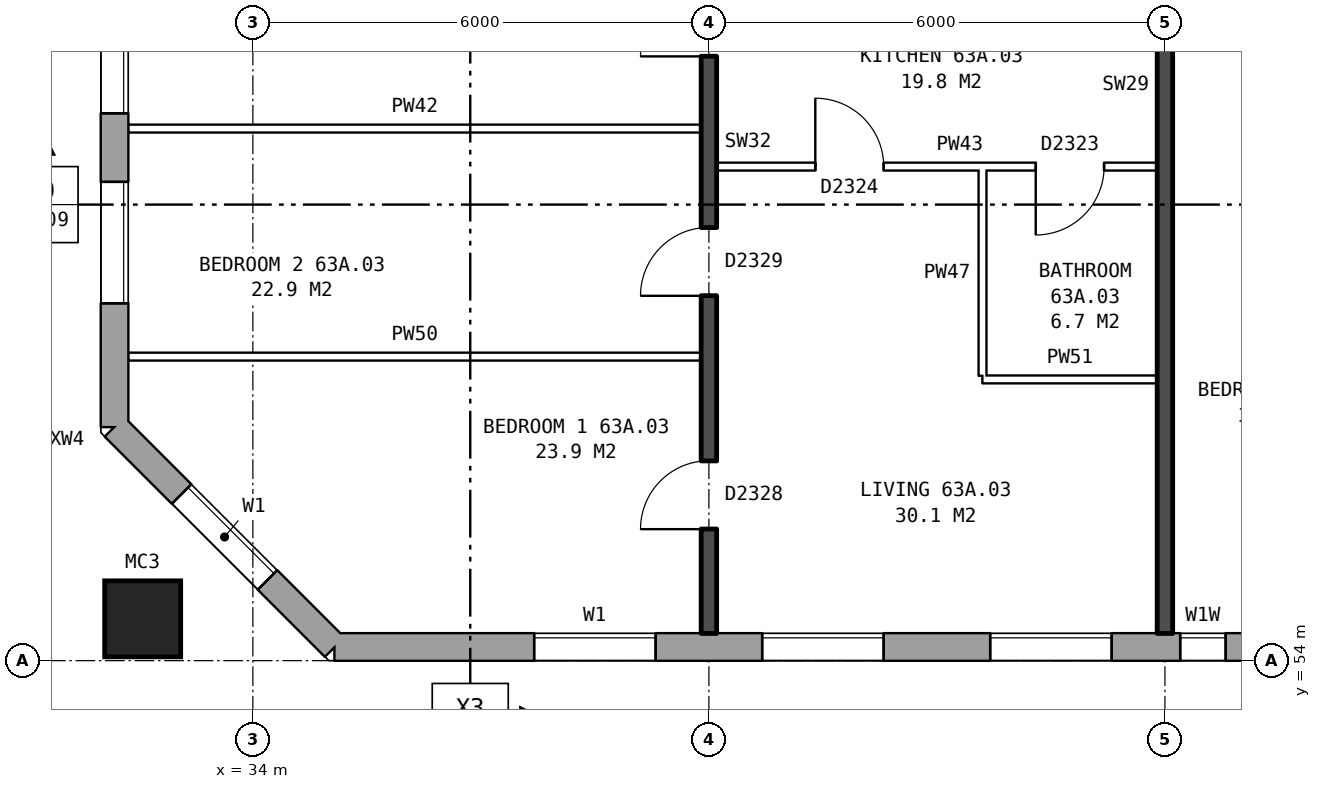
"""IFC4 building model, lengths in metres.
Left out: names, types, materials, properties, quantities, classifications, styles, units other than length and angle.
Written with IfcOpenShell. Run it as: python <this file> out.ifc"""

import sys

from ifc_helpers import new_model, si_unit, direction, frame, frame_2d, origin, origin_2d, place, context, subcontext, project, spatial, rectangle, hollow_rectangle, extrude, element, fill, save


model = new_model("IFC4")
c1 = context("Model", 3, precision=1e-05, world=origin(), true_north=direction((0.0, 1.0)))
c2 = subcontext(c1, "Body", "Model", "MODEL_VIEW")
j1 = project(units=[si_unit("LENGTHUNIT", "METRE"), si_unit("PLANEANGLEUNIT", "RADIAN")], contexts=[c1])
p1 = place(None, origin())
s1 = spatial("IfcSite", under=j1, at=p1, CompositionType="ELEMENT")
p2 = place(p1, origin())
s2 = spatial("IfcBuilding", under=s1, at=p2, CompositionType="ELEMENT")
p3 = place(p2, frame((0.0, 0.0, 224.5)))
s3 = spatial("IfcBuildingStorey", under=s2, at=p3, CompositionType="ELEMENT", Elevation=224.5)
p4 = place(p3, frame((32.55, 54.55, 0.0), z_axis=(0.0, 0.0, 1.0), x_axis=(1.0, 0.0, 0.0)))
e1 = element("IfcColumn", 1, at=p4, inside=s3, PredefinedType="COLUMN", context=c2, shape_type="SweptSolid", body=[
    extrude(hollow_rectangle(XDim=1.0, YDim=1.0, WallThickness=0.055, at=origin_2d()), origin(), (0.0, 0.0, 1.0), 3.1),
])
p5 = place(p3, frame((32.18, 57.075, 0.0), z_axis=(0.0, 0.0, 1.0), x_axis=(0.707106781187, -0.707106781187, 0.0)))
e2 = element("IfcWall", 2, at=p5, inside=s3, PredefinedType="STANDARD", context=c2, shape_type="SweptSolid", body=[
    extrude(rectangle(XDim=4.094, YDim=0.36, at=frame_2d((2.047, 0.0))), origin(), (0.0, 0.0, 1.0), 2.85),
])
p6 = place(p5, frame((1.247, 0.0, 0.8)))
e3 = element("IfcOpeningElement", 3, at=p6, cuts=e2, PredefinedType="OPENING", context=c2, shape_type="SweptSolid", body=[
    extrude(rectangle(XDim=1.6, YDim=1.8, at=frame_2d((0.8, 0.9))), frame((0.0, 0.19, 0.0), z_axis=(0.0, -1.0, 0.0), x_axis=(1.0, 0.0, 0.0)), (0.0, 0.0, 1.0), 0.38),
])
p7 = place(p3, frame((35.075, 54.18, 0.0), z_axis=(0.0, 0.0, 1.0), x_axis=(1.0, 0.0, 0.0)))
e4 = element("IfcWall", 4, at=p7, inside=s3, PredefinedType="STANDARD", context=c2, shape_type="SweptSolid", body=[
    extrude(rectangle(XDim=39.875, YDim=0.36, at=frame_2d((19.938, 0.0))), origin(), (0.0, 0.0, 1.0), 2.85),
])
p8 = place(p7, frame((2.625, 0.0, 0.8)))
e5 = element("IfcOpeningElement", 5, at=p8, cuts=e4, PredefinedType="OPENING", context=c2, shape_type="SweptSolid", body=[
    extrude(rectangle(XDim=1.6, YDim=1.8, at=frame_2d((0.8, 0.9))), frame((0.0, 0.19, 0.0), z_axis=(0.0, -1.0, 0.0), x_axis=(1.0, 0.0, 0.0)), (0.0, 0.0, 1.0), 0.38),
])
p9 = place(p7, frame((5.625, 0.0, 0.8)))
e6 = element("IfcOpeningElement", 6, at=p9, cuts=e4, PredefinedType="OPENING", context=c2, shape_type="SweptSolid", body=[
    extrude(rectangle(XDim=1.6, YDim=1.8, at=frame_2d((0.8, 0.9))), frame((0.0, 0.19, 0.0), z_axis=(0.0, -1.0, 0.0), x_axis=(1.0, 0.0, 0.0)), (0.0, 0.0, 1.0), 0.38),
])
p10 = place(p7, frame((8.625, 0.0, 0.8)))
e7 = element("IfcOpeningElement", 7, at=p10, cuts=e4, PredefinedType="OPENING", context=c2, shape_type="SweptSolid", body=[
    extrude(rectangle(XDim=1.6, YDim=1.8, at=frame_2d((0.8, 0.9))), frame((0.0, 0.19, 0.0), z_axis=(0.0, -1.0, 0.0), x_axis=(1.0, 0.0, 0.0)), (0.0, 0.0, 1.0), 0.38),
])
p11 = place(p7, frame((11.125, 0.0, 1.65)))
e8 = element("IfcOpeningElement", 8, at=p11, cuts=e4, PredefinedType="OPENING", context=c2, shape_type="SweptSolid", body=[
    extrude(rectangle(XDim=0.6, YDim=0.9, at=frame_2d((0.3, 0.45))), frame((0.0, 0.19, 0.0), z_axis=(0.0, -1.0, 0.0), x_axis=(1.0, 0.0, 0.0)), (0.0, 0.0, 1.0), 0.38),
])
p12 = place(p7, frame((14.625, 0.0, 0.8)))
e9 = element("IfcOpeningElement", 9, at=p12, cuts=e4, PredefinedType="OPENING", context=c2, shape_type="SweptSolid", body=[
    extrude(rectangle(XDim=1.6, YDim=1.8, at=frame_2d((0.8, 0.9))), frame((0.0, 0.19, 0.0), z_axis=(0.0, -1.0, 0.0), x_axis=(1.0, 0.0, 0.0)), (0.0, 0.0, 1.0), 0.38),
])
p13 = place(p7, frame((17.625, 0.0, 0.8)))
e10 = element("IfcOpeningElement", 10, at=p13, cuts=e4, PredefinedType="OPENING", context=c2, shape_type="SweptSolid", body=[
    extrude(rectangle(XDim=1.6, YDim=1.8, at=frame_2d((0.8, 0.9))), frame((0.0, 0.19, 0.0), z_axis=(0.0, -1.0, 0.0), x_axis=(1.0, 0.0, 0.0)), (0.0, 0.0, 1.0), 0.38),
])
p14 = place(p7, frame((20.625, 0.0, 0.8)))
e11 = element("IfcOpeningElement", 11, at=p14, cuts=e4, PredefinedType="OPENING", context=c2, shape_type="SweptSolid", body=[
    extrude(rectangle(XDim=1.6, YDim=1.8, at=frame_2d((0.8, 0.9))), frame((0.0, 0.19, 0.0), z_axis=(0.0, -1.0, 0.0), x_axis=(1.0, 0.0, 0.0)), (0.0, 0.0, 1.0), 0.38),
])
p15 = place(p7, frame((23.125, 0.0, 0.75)))
e12 = element("IfcOpeningElement", 12, at=p15, cuts=e4, PredefinedType="OPENING", context=c2, shape_type="SweptSolid", body=[
    extrude(rectangle(XDim=1.2, YDim=1.8, at=frame_2d((0.6, 0.9))), frame((0.0, 0.19, 0.0), z_axis=(0.0, -1.0, 0.0), x_axis=(1.0, 0.0, 0.0)), (0.0, 0.0, 1.0), 0.38),
])
p16 = place(p7, frame((26.625, 0.0, 0.8)))
e13 = element("IfcOpeningElement", 13, at=p16, cuts=e4, PredefinedType="OPENING", context=c2, shape_type="SweptSolid", body=[
    extrude(rectangle(XDim=1.6, YDim=1.8, at=frame_2d((0.8, 0.9))), frame((0.0, 0.19, 0.0), z_axis=(0.0, -1.0, 0.0), x_axis=(1.0, 0.0, 0.0)), (0.0, 0.0, 1.0), 0.38),
])
p17 = place(p7, frame((29.625, 0.0, 0.8)))
e14 = element("IfcOpeningElement", 14, at=p17, cuts=e4, PredefinedType="OPENING", context=c2, shape_type="SweptSolid", body=[
    extrude(rectangle(XDim=1.6, YDim=1.8, at=frame_2d((0.8, 0.9))), frame((0.0, 0.19, 0.0), z_axis=(0.0, -1.0, 0.0), x_axis=(1.0, 0.0, 0.0)), (0.0, 0.0, 1.0), 0.38),
])
p18 = place(p7, frame((32.625, 0.0, 0.8)))
e15 = element("IfcOpeningElement", 15, at=p18, cuts=e4, PredefinedType="OPENING", context=c2, shape_type="SweptSolid", body=[
    extrude(rectangle(XDim=1.6, YDim=1.8, at=frame_2d((0.8, 0.9))), frame((0.0, 0.19, 0.0), z_axis=(0.0, -1.0, 0.0), x_axis=(1.0, 0.0, 0.0)), (0.0, 0.0, 1.0), 0.38),
])
p19 = place(p7, frame((35.625, 0.0, 0.8)))
e16 = element("IfcOpeningElement", 16, at=p19, cuts=e4, PredefinedType="OPENING", context=c2, shape_type="SweptSolid", body=[
    extrude(rectangle(XDim=1.6, YDim=1.8, at=frame_2d((0.8, 0.9))), frame((0.0, 0.19, 0.0), z_axis=(0.0, -1.0, 0.0), x_axis=(1.0, 0.0, 0.0)), (0.0, 0.0, 1.0), 0.38),
])
p20 = place(p7, frame((12.925, 0.0, 0.15)))
e17 = element("IfcOpeningElement", 17, at=p20, cuts=e4, PredefinedType="OPENING", context=c2, shape_type="SweptSolid", body=[
    extrude(rectangle(XDim=0.8, YDim=1.5, at=frame_2d((0.4, 0.75))), frame((0.0, 0.19, 0.0), z_axis=(0.0, -1.0, 0.0), x_axis=(1.0, 0.0, 0.0)), (0.0, 0.0, 1.0), 0.38),
])
p21 = place(p7, frame((24.625, 0.0, 0.25)))
e18 = element("IfcOpeningElement", 18, at=p21, cuts=e4, PredefinedType="OPENING", context=c2, shape_type="SweptSolid", body=[
    extrude(rectangle(XDim=0.6, YDim=0.9, at=frame_2d((0.3, 0.45))), frame((0.0, 0.19, 0.0), z_axis=(0.0, -1.0, 0.0), x_axis=(1.0, 0.0, 0.0)), (0.0, 0.0, 1.0), 0.38),
])
p22 = place(p3, frame((32.18, 82.925, 0.0), z_axis=(0.0, 0.0, 1.0), x_axis=(0.0, -1.0, 0.0)))
e19 = element("IfcWall", 19, at=p22, inside=s3, PredefinedType="STANDARD", context=c2, shape_type="SweptSolid", body=[
    extrude(rectangle(XDim=25.851, YDim=0.36, at=frame_2d((12.925, 0.0))), origin(), (0.0, 0.0, 1.0), 2.85),
])
p23 = place(p22, frame((1.625, 0.0, 0.8)))
e20 = element("IfcOpeningElement", 20, at=p23, cuts=e19, PredefinedType="OPENING", context=c2, shape_type="SweptSolid", body=[
    extrude(rectangle(XDim=1.6, YDim=1.8, at=frame_2d((0.8, 0.9))), frame((0.0, 0.19, 0.0), z_axis=(0.0, -1.0, 0.0), x_axis=(1.0, 0.0, 0.0)), (0.0, 0.0, 1.0), 0.38),
])
p24 = place(p22, frame((4.075, 0.0, 0.8)))
e21 = element("IfcOpeningElement", 21, at=p24, cuts=e19, PredefinedType="OPENING", context=c2, shape_type="SweptSolid", body=[
    extrude(rectangle(XDim=1.4, YDim=1.8, at=frame_2d((0.7, 0.9))), frame((0.0, 0.19, 0.0), z_axis=(0.0, -1.0, 0.0), x_axis=(1.0, 0.0, 0.0)), (0.0, 0.0, 1.0), 0.38),
])
p25 = place(p22, frame((19.425, 0.0, 0.8)))
e22 = element("IfcOpeningElement", 22, at=p25, cuts=e19, PredefinedType="OPENING", context=c2, shape_type="SweptSolid", body=[
    extrude(rectangle(XDim=0.6, YDim=0.9, at=frame_2d((0.3, 0.45))), frame((0.0, 0.19, 0.0), z_axis=(0.0, -1.0, 0.0), x_axis=(1.0, 0.0, 0.0)), (0.0, 0.0, 1.0), 0.38),
])
p26 = place(p22, frame((22.625, 0.0, 0.8)))
e23 = element("IfcOpeningElement", 23, at=p26, cuts=e19, PredefinedType="OPENING", context=c2, shape_type="SweptSolid", body=[
    extrude(rectangle(XDim=1.6, YDim=1.8, at=frame_2d((0.8, 0.9))), frame((0.0, 0.19, 0.0), z_axis=(0.0, -1.0, 0.0), x_axis=(1.0, 0.0, 0.0)), (0.0, 0.0, 1.0), 0.38),
])
p27 = place(p22, frame((5.775, 0.0, 0.8)))
e24 = element("IfcOpeningElement", 24, at=p27, cuts=e19, PredefinedType="OPENING", context=c2, shape_type="SweptSolid", body=[
    extrude(rectangle(XDim=0.6, YDim=0.9, at=frame_2d((0.3, 0.45))), frame((0.0, 0.19, 0.0), z_axis=(0.0, -1.0, 0.0), x_axis=(1.0, 0.0, 0.0)), (0.0, 0.0, 1.0), 0.38),
])
p28 = place(p22, frame((20.325, 0.0, 0.8)))
e25 = element("IfcOpeningElement", 25, at=p28, cuts=e19, PredefinedType="OPENING", context=c2, shape_type="SweptSolid", body=[
    extrude(rectangle(XDim=1.4, YDim=1.8, at=frame_2d((0.7, 0.9))), frame((0.0, 0.19, 0.0), z_axis=(0.0, -1.0, 0.0), x_axis=(1.0, 0.0, 0.0)), (0.0, 0.0, 1.0), 0.38),
])
p29 = place(p3, frame((43.6, 57.7, 0.0), z_axis=(0.0, 0.0, 1.0), x_axis=(1.0, 0.0, 0.0)))
e26 = element("IfcWall", 26, at=p29, inside=s3, PredefinedType="PARTITIONING", context=c2, shape_type="SweptSolid", body=[
    extrude(rectangle(XDim=2.3, YDim=0.1, at=frame_2d((1.15, 0.0))), origin(), (0.0, 0.0, 1.0), 2.85),
])
p30 = place(p3, frame((32.36, 58.0, 0.0), z_axis=(0.0, 0.0, 1.0), x_axis=(1.0, 0.0, 0.0)))
e27 = element("IfcWall", 27, at=p30, inside=s3, PredefinedType="PARTITIONING", context=c2, shape_type="SweptSolid", body=[
    extrude(rectangle(XDim=7.54, YDim=0.1, at=frame_2d((3.77, 0.0))), origin(), (0.0, 0.0, 1.0), 2.85),
])
p31 = place(p3, frame((40.1, 60.5, 0.0), z_axis=(0.0, 0.0, 1.0), x_axis=(1.0, 0.0, 0.0)))
e28 = element("IfcWall", 28, at=p31, inside=s3, PredefinedType="PARTITIONING", context=c2, shape_type="SweptSolid", body=[
    extrude(rectangle(XDim=5.8, YDim=0.1, at=frame_2d((2.9, 0.0))), origin(), (0.0, 0.0, 1.0), 2.85),
])
p32 = place(p31, frame((1.3, 0.0, 0.0)))
e29 = element("IfcOpeningElement", 29, at=p32, cuts=e28, PredefinedType="OPENING", context=c2, shape_type="SweptSolid", body=[
    extrude(rectangle(XDim=0.9, YDim=2.1, at=frame_2d((0.45, 1.05))), frame((0.0, 0.06, 0.0), z_axis=(0.0, -1.0, 0.0), x_axis=(1.0, 0.0, 0.0)), (0.0, 0.0, 1.0), 0.12),
])
p33 = place(p31, frame((4.2, 0.0, 0.0)))
e30 = element("IfcOpeningElement", 30, at=p33, cuts=e28, PredefinedType="OPENING", context=c2, shape_type="SweptSolid", body=[
    extrude(rectangle(XDim=0.9, YDim=2.1, at=frame_2d((0.45, 1.05))), frame((0.0, 0.06, 0.0), z_axis=(0.0, -1.0, 0.0), x_axis=(1.0, 0.0, 0.0)), (0.0, 0.0, 1.0), 0.12),
])
p34 = place(p3, frame((32.36, 61.0, 0.0), z_axis=(0.0, 0.0, 1.0), x_axis=(1.0, 0.0, 0.0)))
e31 = element("IfcWall", 31, at=p34, inside=s3, PredefinedType="PARTITIONING", context=c2, shape_type="SweptSolid", body=[
    extrude(rectangle(XDim=7.54, YDim=0.1, at=frame_2d((3.77, 0.0))), origin(), (0.0, 0.0, 1.0), 2.85),
])
p35 = place(p3, frame((40.0, 54.36, 0.0), z_axis=(0.0, 0.0, 1.0), x_axis=(0.0, 1.0, 0.0)))
e32 = element("IfcWall", 32, at=p35, inside=s3, PredefinedType="SOLIDWALL", context=c2, shape_type="SweptSolid", body=[
    extrude(rectangle(XDim=9.44, YDim=0.2, at=frame_2d((4.72, 0.0))), origin(), (0.0, 0.0, 1.0), 2.85),
])
p36 = place(p35, frame((1.37, 0.0, 0.0)))
e33 = element("IfcOpeningElement", 33, at=p36, cuts=e32, PredefinedType="OPENING", context=c2, shape_type="SweptSolid", body=[
    extrude(rectangle(XDim=0.9, YDim=2.1, at=frame_2d((0.45, 1.05))), frame((0.0, 0.11, 0.0), z_axis=(0.0, -1.0, 0.0), x_axis=(1.0, 0.0, 0.0)), (0.0, 0.0, 1.0), 0.22),
])
p37 = place(p35, frame((4.44, 0.0, 0.0)))
e34 = element("IfcOpeningElement", 34, at=p37, cuts=e32, PredefinedType="OPENING", context=c2, shape_type="SweptSolid", body=[
    extrude(rectangle(XDim=0.9, YDim=2.1, at=frame_2d((0.45, 1.05))), frame((0.0, 0.11, 0.0), z_axis=(0.0, -1.0, 0.0), x_axis=(1.0, 0.0, 0.0)), (0.0, 0.0, 1.0), 0.22),
])
p38 = place(p35, frame((7.59, 0.0, 0.0)))
e35 = element("IfcOpeningElement", 35, at=p38, cuts=e32, PredefinedType="OPENING", context=c2, shape_type="SweptSolid", body=[
    extrude(rectangle(XDim=0.9, YDim=2.1, at=frame_2d((0.45, 1.05))), frame((0.0, 0.11, 0.0), z_axis=(0.0, -1.0, 0.0), x_axis=(1.0, 0.0, 0.0)), (0.0, 0.0, 1.0), 0.22),
])
p39 = place(p3, frame((43.6, 57.75, 0.0), z_axis=(0.0, 0.0, 1.0), x_axis=(0.0, 1.0, 0.0)))
e36 = element("IfcWall", 36, at=p39, inside=s3, PredefinedType="PARTITIONING", context=c2, shape_type="SweptSolid", body=[
    extrude(rectangle(XDim=2.7, YDim=0.1, at=frame_2d((1.35, 0.0))), origin(), (0.0, 0.0, 1.0), 2.85),
])
p40 = place(p3, frame((46.0, 54.36, 0.0), z_axis=(0.0, 0.0, 1.0), x_axis=(0.0, 1.0, 0.0)))
e37 = element("IfcWall", 37, at=p40, inside=s3, PredefinedType="SOLIDWALL", context=c2, shape_type="SweptSolid", body=[
    extrude(rectangle(XDim=14.44, YDim=0.2, at=frame_2d((7.22, 0.0))), origin(), (0.0, 0.0, 1.0), 2.85),
])
p41 = place(p6, origin())
e38 = element("IfcWindow", 38, at=p41, inside=s3, PartitioningType="SINGLE_PANEL", PredefinedType="WINDOW", context=c2, shape_type="SweptSolid", body=[
    extrude(rectangle(XDim=1.6, YDim=1.8, at=frame_2d((0.8, 0.9))), frame((0.0, 0.15, 0.0), z_axis=(0.0, -1.0, 0.0), x_axis=(1.0, 0.0, 0.0)), (0.0, 0.0, 1.0), 0.06),
])
fill(e3, e38)
p42 = place(p8, origin())
e39 = element("IfcWindow", 39, at=p42, inside=s3, PartitioningType="SINGLE_PANEL", PredefinedType="WINDOW", context=c2, shape_type="SweptSolid", body=[
    extrude(rectangle(XDim=1.6, YDim=1.8, at=frame_2d((0.8, 0.9))), frame((0.0, 0.15, 0.0), z_axis=(0.0, -1.0, 0.0), x_axis=(1.0, 0.0, 0.0)), (0.0, 0.0, 1.0), 0.06),
])
fill(e5, e39)
p43 = place(p9, origin())
e40 = element("IfcWindow", 40, at=p43, inside=s3, PartitioningType="SINGLE_PANEL", PredefinedType="WINDOW", context=c2, shape_type="SweptSolid", body=[
    extrude(rectangle(XDim=1.6, YDim=1.8, at=frame_2d((0.8, 0.9))), frame((0.0, 0.15, 0.0), z_axis=(0.0, -1.0, 0.0), x_axis=(1.0, 0.0, 0.0)), (0.0, 0.0, 1.0), 0.06),
])
fill(e6, e40)
p44 = place(p10, origin())
e41 = element("IfcWindow", 41, at=p44, inside=s3, PartitioningType="SINGLE_PANEL", PredefinedType="WINDOW", context=c2, shape_type="SweptSolid", body=[
    extrude(rectangle(XDim=1.6, YDim=1.8, at=frame_2d((0.8, 0.9))), frame((0.0, 0.15, 0.0), z_axis=(0.0, -1.0, 0.0), x_axis=(1.0, 0.0, 0.0)), (0.0, 0.0, 1.0), 0.06),
])
fill(e7, e41)
p45 = place(p11, origin())
e42 = element("IfcWindow", 42, at=p45, inside=s3, PartitioningType="SINGLE_PANEL", PredefinedType="WINDOW", context=c2, shape_type="SweptSolid", body=[
    extrude(rectangle(XDim=0.6, YDim=0.9, at=frame_2d((0.3, 0.45))), frame((0.0, 0.15, 0.0), z_axis=(0.0, -1.0, 0.0), x_axis=(1.0, 0.0, 0.0)), (0.0, 0.0, 1.0), 0.06),
])
fill(e8, e42)
p46 = place(p26, origin())
e43 = element("IfcWindow", 43, at=p46, inside=s3, PartitioningType="SINGLE_PANEL", PredefinedType="WINDOW", context=c2, shape_type="SweptSolid", body=[
    extrude(rectangle(XDim=1.6, YDim=1.8, at=frame_2d((0.8, 0.9))), frame((0.0, 0.15, 0.0), z_axis=(0.0, -1.0, 0.0), x_axis=(1.0, 0.0, 0.0)), (0.0, 0.0, 1.0), 0.06),
])
fill(e23, e43)
p47 = place(p36, origin())
e44 = element("IfcDoor", 44, at=p47, inside=s3, OperationType="SINGLE_SWING_LEFT", PredefinedType="DOOR", context=c2, shape_type="SweptSolid", body=[
    extrude(rectangle(XDim=0.9, YDim=2.1, at=frame_2d((0.45, 1.05))), frame((0.0, 0.025, 0.0), z_axis=(0.0, -1.0, 0.0), x_axis=(1.0, 0.0, 0.0)), (0.0, 0.0, 1.0), 0.05),
])
fill(e33, e44)
p48 = place(p37, origin())
e45 = element("IfcDoor", 45, at=p48, inside=s3, OperationType="SINGLE_SWING_LEFT", PredefinedType="DOOR", context=c2, shape_type="SweptSolid", body=[
    extrude(rectangle(XDim=0.9, YDim=2.1, at=frame_2d((0.45, 1.05))), frame((0.0, 0.025, 0.0), z_axis=(0.0, -1.0, 0.0), x_axis=(1.0, 0.0, 0.0)), (0.0, 0.0, 1.0), 0.05),
])
fill(e34, e45)
p49 = place(p38, origin())
e46 = element("IfcDoor", 46, at=p49, inside=s3, OperationType="SINGLE_SWING_LEFT", PredefinedType="DOOR", context=c2, shape_type="SweptSolid", body=[
    extrude(rectangle(XDim=0.9, YDim=2.1, at=frame_2d((0.45, 1.05))), frame((0.0, 0.025, 0.0), z_axis=(0.0, -1.0, 0.0), x_axis=(1.0, 0.0, 0.0)), (0.0, 0.0, 1.0), 0.05),
])
fill(e35, e46)
p50 = place(p32, origin())
e47 = element("IfcDoor", 47, at=p50, inside=s3, OperationType="SINGLE_SWING_LEFT", PredefinedType="DOOR", context=c2, shape_type="SweptSolid", body=[
    extrude(rectangle(XDim=0.9, YDim=2.1, at=frame_2d((0.45, 1.05))), frame((0.0, 0.025, 0.0), z_axis=(0.0, -1.0, 0.0), x_axis=(1.0, 0.0, 0.0)), (0.0, 0.0, 1.0), 0.05),
])
fill(e29, e47)
p51 = place(p33, frame((0.9, 0.0, 0.0), z_axis=(0.0, 0.0, 1.0), x_axis=(-1.0, 0.0, 0.0)))
e48 = element("IfcDoor", 48, at=p51, inside=s3, OperationType="SINGLE_SWING_RIGHT", PredefinedType="DOOR", context=c2, shape_type="SweptSolid", body=[
    extrude(rectangle(XDim=0.9, YDim=2.1, at=frame_2d((0.45, 1.05))), frame((0.0, 0.025, 0.0), z_axis=(0.0, -1.0, 0.0), x_axis=(1.0, 0.0, 0.0)), (0.0, 0.0, 1.0), 0.05),
])
fill(e30, e48)
p52 = place(p28, origin())
e49 = element("IfcWindow", 49, at=p52, inside=s3, PartitioningType="SINGLE_PANEL", PredefinedType="WINDOW", context=c2, shape_type="SweptSolid", body=[
    extrude(rectangle(XDim=1.4, YDim=1.8, at=frame_2d((0.7, 0.9))), frame((0.0, 0.15, 0.0), z_axis=(0.0, -1.0, 0.0), x_axis=(1.0, 0.0, 0.0)), (0.0, 0.0, 1.0), 0.06),
])
fill(e25, e49)
save(model, sys.argv[1])
